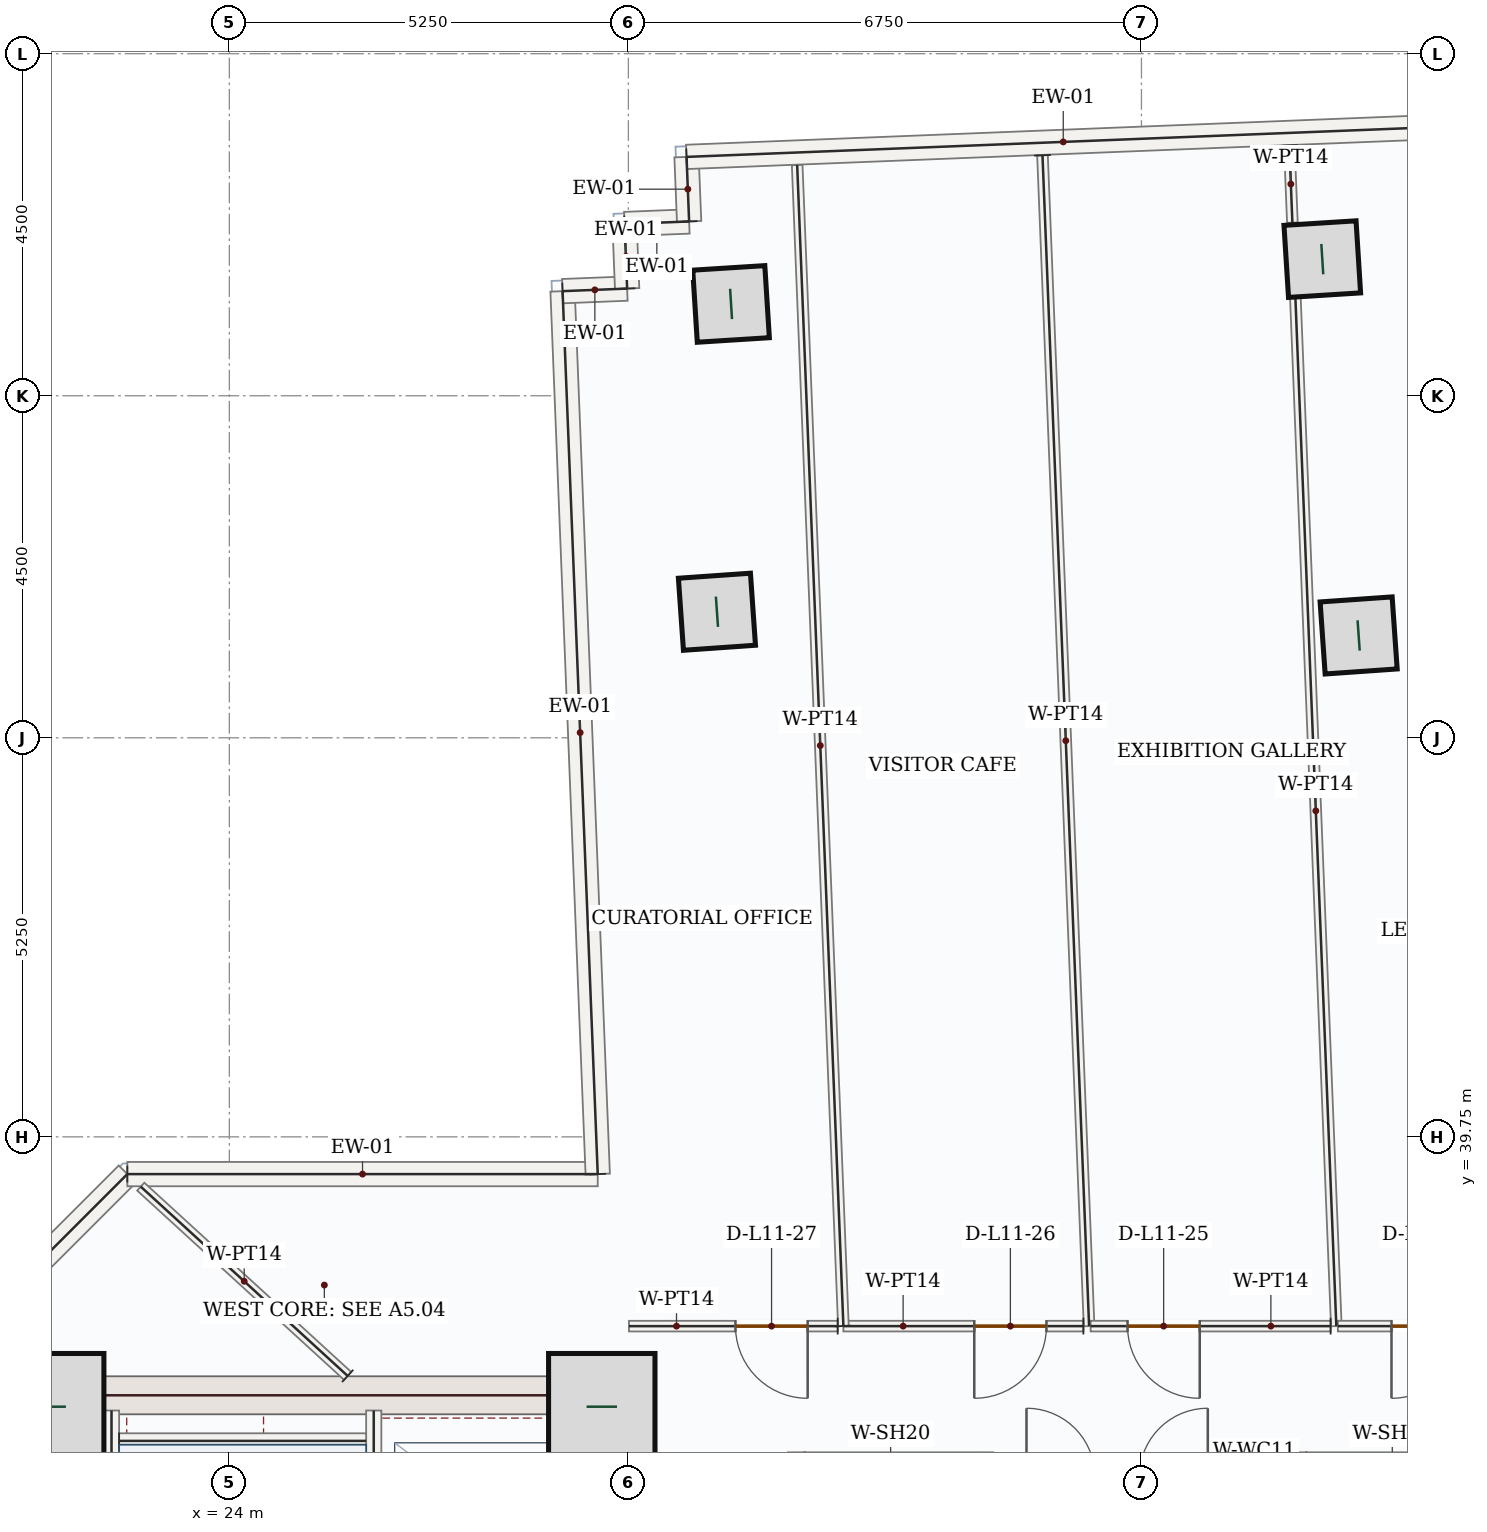
"""IFC4 building model, lengths in metres.
Left out: names, types, materials, properties, quantities, classifications, styles, units other than length and angle.
Written with IfcOpenShell. Run it as: python <this file> out.ifc"""

import sys

from ifc_helpers import new_model, si_unit, direction, frame, frame_2d, origin, origin_2d, place, context, subcontext, project, spatial, rectangle, hollow_rectangle, extrude, source, transform, mapped, element, fill, save


model = new_model("IFC4")
c1 = context("Model", 3, precision=1e-05, world=origin(), true_north=direction((0.0, 1.0)))
c2 = subcontext(c1, "Body", "Model", "MODEL_VIEW")
j1 = project(units=[si_unit("LENGTHUNIT", "METRE"), si_unit("PLANEANGLEUNIT", "RADIAN")], contexts=[c1])
p1 = place(None, origin())
s1 = spatial("IfcSite", under=j1, at=p1, CompositionType="ELEMENT")
p2 = place(p1, origin())
s2 = spatial("IfcBuilding", under=s1, at=p2, CompositionType="ELEMENT")
p3 = place(p2, frame((0.0, 0.0, 54.3)))
s3 = spatial("IfcBuildingStorey", under=s2, at=p3, CompositionType="ELEMENT", Elevation=54.3)
m1 = source(origin(), c2, "Body", "SweptSolid", [
    extrude(rectangle(XDim=8.55, YDim=0.5, at=frame_2d((4.275, 0.0))), origin(), (0.0, 0.0, 1.0), 3.95),
])
p4 = place(p3, frame((21.5, 28.05, 0.0), z_axis=(0.0, 0.0, 1.0), x_axis=(0.0, 1.0, 0.0)))
e1 = element("IfcWall", 1, at=p4, inside=s3, PredefinedType="SHEAR", context=c2, shape_type="MappedRepresentation", body=[
    mapped(m1, transform((0.0, 0.0, 0.0), x_axis=(1.0, 0.0, 0.0), y_axis=(0.0, 1.0, 0.0), z_axis=(0.0, 0.0, 1.0), scale=1.0)),
])
p5 = place(p3, frame((29.0, 28.05, 0.0), z_axis=(0.0, 0.0, 1.0), x_axis=(0.0, 1.0, 0.0)))
e2 = element("IfcWall", 2, at=p5, inside=s3, PredefinedType="SHEAR", context=c2, shape_type="SweptSolid", body=[
    extrude(rectangle(XDim=8.55, YDim=0.5, at=frame_2d((4.275, 0.0))), origin(), (0.0, 0.0, 1.0), 3.95),
])
p6 = place(p5, frame((1.5, 0.0, 0.0)))
e3 = element("IfcOpeningElement", 3, at=p6, cuts=e2, PredefinedType="OPENING", context=c2, shape_type="SweptSolid", body=[
    extrude(rectangle(XDim=1.1, YDim=2.2, at=frame_2d((0.55, 1.1))), frame((0.0, 0.26, 0.0), z_axis=(0.0, -1.0, 0.0), x_axis=(1.0, 0.0, 0.0)), (0.0, 0.0, 1.0), 0.52),
])
m2 = source(origin(), c2, "Body", "SweptSolid", [
    extrude(rectangle(XDim=7.0, YDim=0.5, at=frame_2d((3.5, 0.0))), origin(), (0.0, 0.0, 1.0), 3.95),
])
p7 = place(p3, frame((21.75, 36.35, 0.0), z_axis=(0.0, 0.0, 1.0), x_axis=(1.0, 0.0, 0.0)))
e4 = element("IfcWall", 4, at=p7, inside=s3, PredefinedType="SHEAR", context=c2, shape_type="MappedRepresentation", body=[
    mapped(m2, transform((0.0, 0.0, 0.0), x_axis=(1.0, 0.0, 0.0), y_axis=(0.0, 1.0, 0.0), z_axis=(0.0, 0.0, 1.0), scale=1.0)),
])
m3 = source(origin(), c2, "Body", "SweptSolid", [
    extrude(rectangle(XDim=1.4, YDim=1.4, at=origin_2d()), origin(), (0.0, 0.0, 1.0), 4.2),
])
for number, where, z_axis, x_axis in (
    (5, (21.65, 36.2, 0.0), (0.0, 0.0, 1.0), (1.0, 0.0, 0.0)),
    (6, (28.9, 36.2, 0.0), (0.0, 0.0, 1.0), (1.0, 0.0, 0.0)),
):
    element("IfcColumn", number, at=place(p3, frame(where, z_axis=z_axis, x_axis=x_axis)), inside=s3, PredefinedType="COLUMN", context=c2, shape_type="MappedRepresentation", body=[
        mapped(m3, transform((0.0, 0.0, 0.0), x_axis=(1.0, 0.0, 0.0), y_axis=(0.0, 1.0, 0.0), z_axis=(0.0, 0.0, 1.0), scale=1.0)),
    ])
m4 = source(origin(), c2, "Body", "SweptSolid", [
    extrude(hollow_rectangle(XDim=0.95, YDim=0.95, WallThickness=0.05, at=origin_2d()), origin(), (0.0, 0.0, 1.0), 4.2),
])
for number, where, z_axis, x_axis in (
    (7, (38.857, 46.346, 0.0), (0.0, 0.0, 1.0), (-0.07, 0.998, 0.0)),
    (8, (30.415, 46.658, 0.0), (0.0, 0.0, 1.0), (-0.07, 0.998, 0.0)),
    (9, (38.379, 51.297, 0.0), (0.0, 0.0, 1.0), (-0.063, 0.998, 0.0)),
    (10, (30.601, 50.708, 0.0), (0.0, 0.0, 1.0), (-0.063, 0.998, 0.0)),
):
    element("IfcColumn", number, at=place(p3, frame(where, z_axis=z_axis, x_axis=x_axis)), inside=s3, PredefinedType="COLUMN", context=c2, shape_type="MappedRepresentation", body=[
        mapped(m4, transform((0.0, 0.0, 0.0), x_axis=(1.0, 0.0, 0.0), y_axis=(0.0, 1.0, 0.0), z_axis=(0.0, 0.0, 1.0), scale=1.0)),
    ])
m5 = source(origin(), c2, "Body", "SweptSolid", [
    extrude(rectangle(XDim=5.258, YDim=0.32, at=frame_2d((2.629, 0.0))), origin(), (0.0, 0.0, 1.0), 3.95),
])
p8 = place(p3, frame((18.94, 35.542, 0.0), z_axis=(0.0, 0.0, 1.0), x_axis=(0.707106781187, 0.707106781187, 0.0)))
e11 = element("IfcWall", 11, at=p8, inside=s3, PredefinedType="SOLIDWALL", context=c2, shape_type="MappedRepresentation", body=[
    mapped(m5, transform((0.0, 0.0, 0.0), x_axis=(1.0, 0.0, 0.0), y_axis=(0.0, 1.0, 0.0), z_axis=(0.0, 0.0, 1.0), scale=1.0)),
])
m6 = source(origin(), c2, "Body", "SweptSolid", [
    extrude(rectangle(XDim=6.189, YDim=0.32, at=frame_2d((3.094, 0.0))), origin(), (0.0, 0.0, 1.0), 3.95),
])
p9 = place(p3, frame((22.658, 39.26, 0.0), z_axis=(0.0, 0.0, 1.0), x_axis=(1.0, 0.0, 0.0)))
e12 = element("IfcWall", 12, at=p9, inside=s3, PredefinedType="SOLIDWALL", context=c2, shape_type="MappedRepresentation", body=[
    mapped(m6, transform((0.0, 0.0, 0.0), x_axis=(1.0, 0.0, 0.0), y_axis=(0.0, 1.0, 0.0), z_axis=(0.0, 0.0, 1.0), scale=1.0)),
])
m7 = source(origin(), c2, "Body", "SweptSolid", [
    extrude(rectangle(XDim=11.625, YDim=0.32, at=frame_2d((5.812, 0.0))), origin(), (0.0, 0.0, 1.0), 3.95),
])
p10 = place(p3, frame((28.847, 39.26, 0.0), z_axis=(0.0, 0.0, 1.0), x_axis=(-0.039775975357, 0.999208622753, 0.0)))
e13 = element("IfcWall", 13, at=p10, inside=s3, PredefinedType="SOLIDWALL", context=c2, shape_type="MappedRepresentation", body=[
    mapped(m7, transform((0.0, 0.0, 0.0), x_axis=(1.0, 0.0, 0.0), y_axis=(0.0, 1.0, 0.0), z_axis=(0.0, 0.0, 1.0), scale=1.0)),
])
m8 = source(origin(), c2, "Body", "SweptSolid", [
    extrude(rectangle(XDim=0.85, YDim=0.32, at=frame_2d((0.425, 0.0))), origin(), (0.0, 0.0, 1.0), 3.95),
])
for number, where, z_axis, x_axis in (
    (14, (28.384, 50.876, 0.0), (0.0, 0.0, 1.0), (0.999, 0.04, 0.0)),
    (15, (29.233, 50.91, 0.0), (0.0, 0.0, 1.0), (-0.04, 0.999, 0.0)),
):
    element("IfcWall", number, at=place(p3, frame(where, z_axis=z_axis, x_axis=x_axis)), inside=s3, PredefinedType="SOLIDWALL", context=c2, shape_type="MappedRepresentation", body=[
        mapped(m8, transform((0.0, 0.0, 0.0), x_axis=(1.0, 0.0, 0.0), y_axis=(0.0, 1.0, 0.0), z_axis=(0.0, 0.0, 1.0), scale=1.0)),
    ])
m9 = source(origin(), c2, "Body", "SweptSolid", [
    extrude(rectangle(XDim=0.85, YDim=0.32, at=frame_2d((0.425, 0.0))), origin(), (0.0, 0.0, 1.0), 3.95),
])
p11 = place(p3, frame((29.2, 51.759, 0.0), z_axis=(0.0, 0.0, 1.0), x_axis=(0.999202792875, 0.039922158152, 0.0)))
e16 = element("IfcWall", 16, at=p11, inside=s3, PredefinedType="SOLIDWALL", context=c2, shape_type="MappedRepresentation", body=[
    mapped(m9, transform((0.0, 0.0, 0.0), x_axis=(1.0, 0.0, 0.0), y_axis=(0.0, 1.0, 0.0), z_axis=(0.0, 0.0, 1.0), scale=1.0)),
])
p12 = place(p3, frame((30.049, 51.793, 0.0), z_axis=(0.0, 0.0, 1.0), x_axis=(-0.039933618331, 0.999202334929, 0.0)))
e17 = element("IfcWall", 17, at=p12, inside=s3, PredefinedType="SOLIDWALL", context=c2, shape_type="MappedRepresentation", body=[
    mapped(m8, transform((0.0, 0.0, 0.0), x_axis=(1.0, 0.0, 0.0), y_axis=(0.0, 1.0, 0.0), z_axis=(0.0, 0.0, 1.0), scale=1.0)),
])
m10 = source(origin(), c2, "Body", "SweptSolid", [
    extrude(rectangle(XDim=9.92, YDim=0.32, at=frame_2d((4.96, 0.0))), origin(), (0.0, 0.0, 1.0), 3.95),
])
p13 = place(p3, frame((30.015, 52.642, 0.0), z_axis=(0.0, 0.0, 1.0), x_axis=(0.999207823998, 0.039796035749, 0.0)))
e18 = element("IfcWall", 18, at=p13, inside=s3, PredefinedType="SOLIDWALL", context=c2, shape_type="MappedRepresentation", body=[
    mapped(m10, transform((0.0, 0.0, 0.0), x_axis=(1.0, 0.0, 0.0), y_axis=(0.0, 1.0, 0.0), z_axis=(0.0, 0.0, 1.0), scale=1.0)),
])
m11 = source(origin(), c2, "Body", "SweptSolid", [
    extrude(rectangle(XDim=7.87, YDim=0.2, at=frame_2d((3.935, 0.0))), origin(), (0.0, 0.0, 1.0), 3.95),
])
p14 = place(p3, frame((22.45, 28.28, 0.0), z_axis=(0.0, 0.0, 1.0), x_axis=(0.0, 1.0, 0.0)))
e19 = element("IfcWall", 19, at=p14, inside=s3, PredefinedType="SOLIDWALL", context=c2, shape_type="MappedRepresentation", body=[
    mapped(m11, transform((0.0, 0.0, 0.0), x_axis=(1.0, 0.0, 0.0), y_axis=(0.0, 1.0, 0.0), z_axis=(0.0, 0.0, 1.0), scale=1.0)),
])
p15 = place(p3, frame((25.9, 28.15, 0.0), z_axis=(0.0, 0.0, 1.0), x_axis=(0.0, 1.0, 0.0)))
e20 = element("IfcWall", 20, at=p15, inside=s3, PredefinedType="SOLIDWALL", context=c2, shape_type="SweptSolid", body=[
    extrude(rectangle(XDim=8.0, YDim=0.2, at=frame_2d((4.0, 0.0))), origin(), (0.0, 0.0, 1.0), 3.95),
])
p16 = place(p15, frame((0.4, 0.0, 0.0)))
e21 = element("IfcOpeningElement", 21, at=p16, cuts=e20, PredefinedType="OPENING", context=c2, shape_type="SweptSolid", body=[
    extrude(rectangle(XDim=1.05, YDim=2.15, at=frame_2d((0.525, 1.075))), frame((0.0, 0.11, 0.0), z_axis=(0.0, -1.0, 0.0), x_axis=(1.0, 0.0, 0.0)), (0.0, 0.0, 1.0), 0.22),
])
m12 = source(origin(), c2, "Body", "SweptSolid", [
    extrude(rectangle(XDim=3.25, YDim=0.2, at=frame_2d((1.625, 0.0))), origin(), (0.0, 0.0, 1.0), 3.95),
])
p17 = place(p3, frame((22.55, 35.75, 0.0), z_axis=(0.0, 0.0, 1.0), x_axis=(1.0, 0.0, 0.0)))
e22 = element("IfcWall", 22, at=p17, inside=s3, PredefinedType="SOLIDWALL", context=c2, shape_type="MappedRepresentation", body=[
    mapped(m12, transform((0.0, 0.0, 0.0), x_axis=(1.0, 0.0, 0.0), y_axis=(0.0, 1.0, 0.0), z_axis=(0.0, 0.0, 1.0), scale=1.0)),
])
m13 = source(origin(), c2, "Body", "SweptSolid", [
    extrude(rectangle(XDim=2.4, YDim=0.2, at=frame_2d((1.2, 0.0))), origin(), (0.0, 0.0, 1.0), 3.95),
])
for number, where, z_axis, x_axis in (
    (23, (31.45, 33.2, 0.0), (0.0, 0.0, 1.0), (0.0, 1.0, 0.0)),
    (24, (33.95, 33.2, 0.0), (0.0, 0.0, 1.0), (0.0, 1.0, 0.0)),
    (25, (38.05, 33.2, 0.0), (0.0, 0.0, 1.0), (0.0, 1.0, 0.0)),
):
    element("IfcWall", number, at=place(p3, frame(where, z_axis=z_axis, x_axis=x_axis)), inside=s3, PredefinedType="SOLIDWALL", context=c2, shape_type="MappedRepresentation", body=[
        mapped(m13, transform((0.0, 0.0, 0.0), x_axis=(1.0, 0.0, 0.0), y_axis=(0.0, 1.0, 0.0), z_axis=(0.0, 0.0, 1.0), scale=1.0)),
    ])
m14 = source(origin(), c2, "Body", "SweptSolid", [
    extrude(rectangle(XDim=15.416, YDim=0.14, at=frame_2d((7.708, 0.0))), origin(), (0.0, 0.0, 1.0), 3.95),
])
p18 = place(p3, frame((34.698, 52.664, 0.0), z_axis=(0.0, 0.0, 1.0), x_axis=(0.039782723686, -0.999208354096, 0.0)))
e26 = element("IfcWall", 26, at=p18, inside=s3, PredefinedType="PARTITIONING", context=c2, shape_type="MappedRepresentation", body=[
    mapped(m14, transform((0.0, 0.0, 0.0), x_axis=(1.0, 0.0, 0.0), y_axis=(0.0, 1.0, 0.0), z_axis=(0.0, 0.0, 1.0), scale=1.0)),
])
p19 = place(p3, frame((35.236, 37.26, 0.0), z_axis=(0.0, 0.0, 1.0), x_axis=(-1.0, 0.0, 0.0)))
e27 = element("IfcWall", 27, at=p19, inside=s3, PredefinedType="PARTITIONING", context=c2, shape_type="SweptSolid", body=[
    extrude(rectangle(XDim=3.157, YDim=0.14, at=frame_2d((1.579, 0.0))), origin(), (0.0, 0.0, 1.0), 3.95),
])
p20 = place(p19, frame((0.486, 0.0, 0.0)))
e28 = element("IfcOpeningElement", 28, at=p20, cuts=e27, PredefinedType="OPENING", context=c2, shape_type="SweptSolid", body=[
    extrude(rectangle(XDim=0.95, YDim=2.15, at=frame_2d((0.475, 1.075))), frame((0.0, 0.08, 0.0), z_axis=(0.0, -1.0, 0.0), x_axis=(1.0, 0.0, 0.0)), (0.0, 0.0, 1.0), 0.16),
])
m15 = source(origin(), c2, "Body", "SweptSolid", [
    extrude(rectangle(XDim=15.286, YDim=0.14, at=frame_2d((7.643, 0.0))), origin(), (0.0, 0.0, 1.0), 3.95),
])
p21 = place(p3, frame((32.079, 37.261, 0.0), z_axis=(0.0, 0.0, 1.0), x_axis=(-0.039769031662, 0.99920889914, 0.0)))
e29 = element("IfcWall", 29, at=p21, inside=s3, PredefinedType="PARTITIONING", context=c2, shape_type="MappedRepresentation", body=[
    mapped(m15, transform((0.0, 0.0, 0.0), x_axis=(1.0, 0.0, 0.0), y_axis=(0.0, 1.0, 0.0), z_axis=(0.0, 0.0, 1.0), scale=1.0)),
])
m16 = source(origin(), c2, "Body", "SweptSolid", [
    extrude(rectangle(XDim=1.016, YDim=0.14, at=frame_2d((0.508, 0.0))), origin(), (0.0, 0.0, 1.0), 3.95),
])
p22 = place(p3, frame((37.945, 52.793, 0.0), z_axis=(0.0, 0.0, 1.0), x_axis=(0.03988168596, -0.99920440908, 0.0)))
e30 = element("IfcWall", 30, at=p22, inside=s3, PredefinedType="PARTITIONING", context=c2, shape_type="MappedRepresentation", body=[
    mapped(m16, transform((0.0, 0.0, 0.0), x_axis=(1.0, 0.0, 0.0), y_axis=(0.0, 1.0, 0.0), z_axis=(0.0, 0.0, 1.0), scale=1.0)),
])
m17 = source(origin(), c2, "Body", "SweptSolid", [
    extrude(rectangle(XDim=13.568, YDim=0.14, at=frame_2d((6.784, 0.0))), origin(), (0.0, 0.0, 1.0), 3.95),
])
p23 = place(p3, frame((38.024, 50.817, 0.0), z_axis=(0.0, 0.0, 1.0), x_axis=(0.039766111253, -0.99920901537, 0.0)))
e31 = element("IfcWall", 31, at=p23, inside=s3, PredefinedType="PARTITIONING", context=c2, shape_type="MappedRepresentation", body=[
    mapped(m17, transform((0.0, 0.0, 0.0), x_axis=(1.0, 0.0, 0.0), y_axis=(0.0, 1.0, 0.0), z_axis=(0.0, 0.0, 1.0), scale=1.0)),
])
p24 = place(p3, frame((38.489, 37.26, 0.0), z_axis=(0.0, 0.0, 1.0), x_axis=(-1.0, 0.0, 0.0)))
e32 = element("IfcWall", 32, at=p24, inside=s3, PredefinedType="PARTITIONING", context=c2, shape_type="SweptSolid", body=[
    extrude(rectangle(XDim=3.157, YDim=0.14, at=frame_2d((1.579, 0.0))), origin(), (0.0, 0.0, 1.0), 3.95),
])
p25 = place(p24, frame((1.722, 0.0, 0.0)))
e33 = element("IfcOpeningElement", 33, at=p25, cuts=e32, PredefinedType="OPENING", context=c2, shape_type="SweptSolid", body=[
    extrude(rectangle(XDim=0.95, YDim=2.15, at=frame_2d((0.475, 1.075))), frame((0.0, 0.08, 0.0), z_axis=(0.0, -1.0, 0.0), x_axis=(1.0, 0.0, 0.0)), (0.0, 0.0, 1.0), 0.16),
])
p26 = place(p3, frame((32.004, 37.26, 0.0), z_axis=(0.0, 0.0, 1.0), x_axis=(-0.999999996048, -8.8904694e-05, 0.0)))
e34 = element("IfcWall", 34, at=p26, inside=s3, PredefinedType="PARTITIONING", context=c2, shape_type="SweptSolid", body=[
    extrude(rectangle(XDim=2.746, YDim=0.14, at=frame_2d((1.373, 0.0))), origin(), (0.0, 0.0, 1.0), 3.95),
])
p27 = place(p26, frame((0.395, 0.0, 0.0)))
e35 = element("IfcOpeningElement", 35, at=p27, cuts=e34, PredefinedType="OPENING", context=c2, shape_type="SweptSolid", body=[
    extrude(rectangle(XDim=0.95, YDim=2.15, at=frame_2d((0.475, 1.075))), frame((0.0, 0.08, 0.0), z_axis=(0.0, -1.0, 0.0), x_axis=(1.0, 0.0, 0.0)), (0.0, 0.0, 1.0), 0.16),
])
m18 = source(origin(), c2, "Body", "SweptSolid", [
    extrude(rectangle(XDim=3.689, YDim=0.14, at=frame_2d((1.844, 0.0))), origin(), (0.0, 0.0, 1.0), 3.95),
])
p28 = place(p3, frame((25.557, 36.605, 0.0), z_axis=(0.0, 0.0, 1.0), x_axis=(-0.737843279395, 0.674972069831, 0.0)))
e36 = element("IfcWall", 36, at=p28, inside=s3, PredefinedType="PARTITIONING", context=c2, shape_type="MappedRepresentation", body=[
    mapped(m18, transform((0.0, 0.0, 0.0), x_axis=(1.0, 0.0, 0.0), y_axis=(0.0, 1.0, 0.0), z_axis=(0.0, 0.0, 1.0), scale=1.0)),
])
p29 = place(p3, frame((42.742, 37.26, 0.0), z_axis=(0.0, 0.0, 1.0), x_axis=(-0.999999998277, 5.8706117e-05, 0.0)))
e37 = element("IfcWall", 37, at=p29, inside=s3, PredefinedType="PARTITIONING", context=c2, shape_type="SweptSolid", body=[
    extrude(rectangle(XDim=4.159, YDim=0.14, at=frame_2d((2.079, 0.0))), origin(), (0.0, 0.0, 1.0), 3.95),
])
p30 = place(p29, frame((2.503, 0.0, 0.0)))
e38 = element("IfcOpeningElement", 38, at=p30, cuts=e37, PredefinedType="OPENING", context=c2, shape_type="SweptSolid", body=[
    extrude(rectangle(XDim=0.95, YDim=2.15, at=frame_2d((0.475, 1.075))), frame((0.0, 0.08, 0.0), z_axis=(0.0, -1.0, 0.0), x_axis=(1.0, 0.0, 0.0)), (0.0, 0.0, 1.0), 0.16),
])
m19 = source(origin(), c2, "Body", "SweptSolid", [
    extrude(rectangle(XDim=0.95, YDim=2.15, at=frame_2d((0.475, 1.075))), frame((0.0, 0.025, 0.0), z_axis=(0.0, -1.0, 0.0), x_axis=(1.0, 0.0, 0.0)), (0.0, 0.0, 1.0), 0.05),
])
p31 = place(p30, origin())
e39 = element("IfcDoor", 39, at=p31, inside=s3, OperationType="SINGLE_SWING_RIGHT", PredefinedType="DOOR", context=c2, shape_type="MappedRepresentation", body=[
    mapped(m19, transform((0.0, 0.0, 0.0), x_axis=(1.0, 0.0, 0.0), y_axis=(0.0, 1.0, 0.0), z_axis=(0.0, 0.0, 1.0), scale=1.0)),
])
fill(e38, e39)
p32 = place(p25, origin())
e40 = element("IfcDoor", 40, at=p32, inside=s3, OperationType="SINGLE_SWING_LEFT", PredefinedType="DOOR", context=c2, shape_type="MappedRepresentation", body=[
    mapped(m19, transform((0.0, 0.0, 0.0), x_axis=(1.0, 0.0, 0.0), y_axis=(0.0, 1.0, 0.0), z_axis=(0.0, 0.0, 1.0), scale=1.0)),
])
fill(e33, e40)
p33 = place(p20, origin())
e41 = element("IfcDoor", 41, at=p33, inside=s3, OperationType="SINGLE_SWING_RIGHT", PredefinedType="DOOR", context=c2, shape_type="MappedRepresentation", body=[
    mapped(m19, transform((0.0, 0.0, 0.0), x_axis=(1.0, 0.0, 0.0), y_axis=(0.0, 1.0, 0.0), z_axis=(0.0, 0.0, 1.0), scale=1.0)),
])
fill(e28, e41)
p34 = place(p27, origin())
e42 = element("IfcDoor", 42, at=p34, inside=s3, OperationType="SINGLE_SWING_LEFT", PredefinedType="DOOR", context=c2, shape_type="MappedRepresentation", body=[
    mapped(m19, transform((0.0, 0.0, 0.0), x_axis=(1.0, 0.0, 0.0), y_axis=(0.0, 1.0, 0.0), z_axis=(0.0, 0.0, 1.0), scale=1.0)),
])
fill(e35, e42)
save(model, sys.argv[1])
